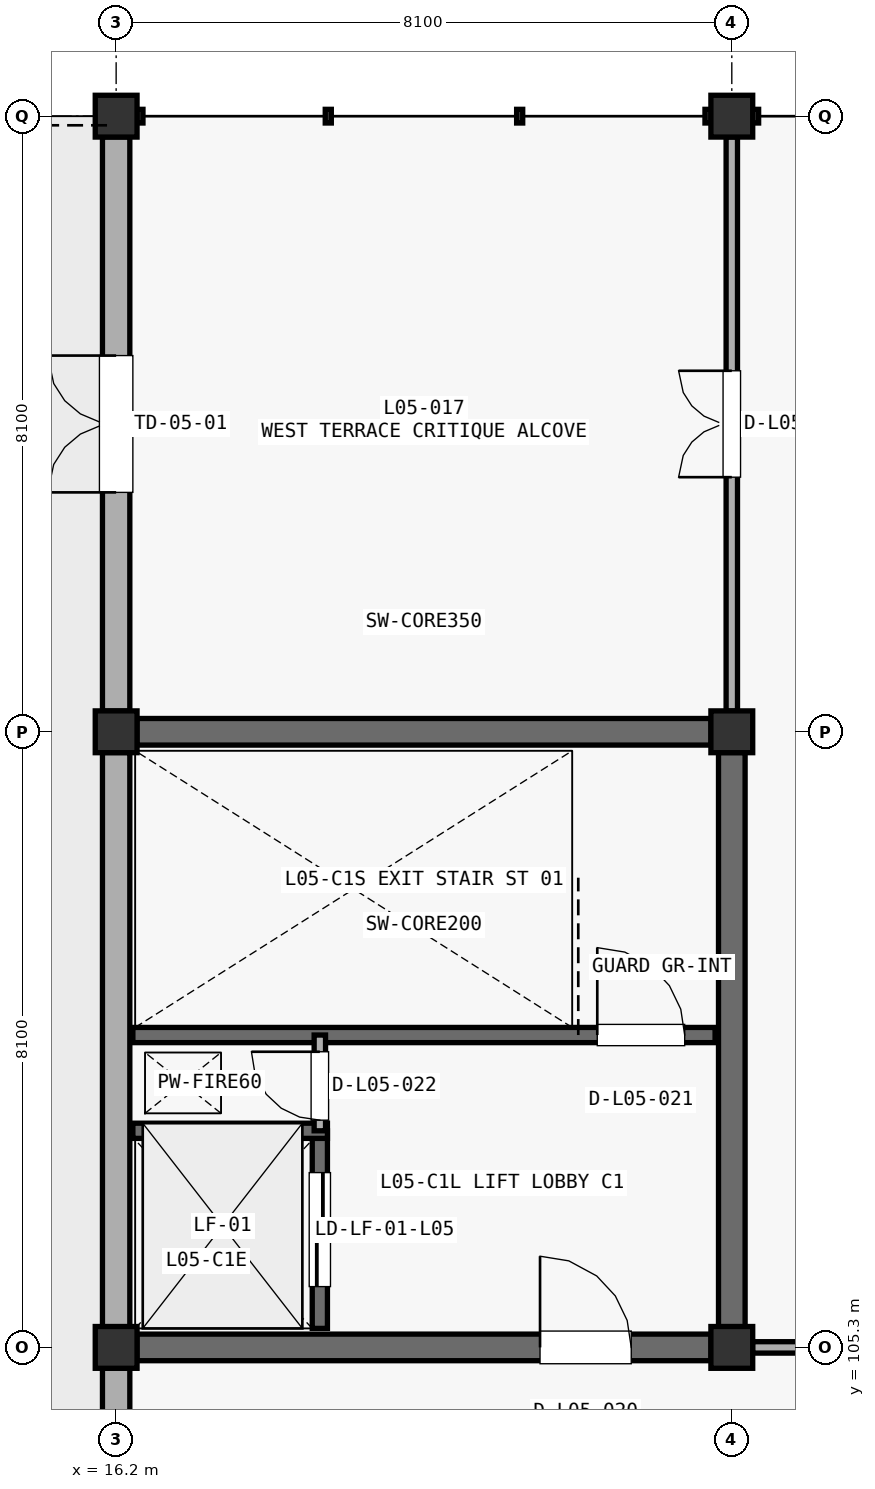
"""IFC4 building model, lengths in metres.
Left out: names, types, materials, properties, quantities, classifications, styles, units other than length and angle.
Written with IfcOpenShell. Run it as: python <this file> out.ifc"""

import sys

from ifc_helpers import new_model, si_unit, direction, frame, frame_2d, origin, origin_2d, place, context, subcontext, project, spatial, rectangle, extrude, element, fill, save


model = new_model("IFC4")
c1 = context("Model", 3, precision=1e-05, world=origin(), true_north=direction((0.0, 1.0)))
c2 = subcontext(c1, "Body", "Model", "MODEL_VIEW")
j1 = project(units=[si_unit("LENGTHUNIT", "METRE"), si_unit("PLANEANGLEUNIT", "RADIAN")], contexts=[c1])
p1 = place(None, origin())
s1 = spatial("IfcSite", under=j1, at=p1, CompositionType="ELEMENT")
p2 = place(p1, origin())
s2 = spatial("IfcBuilding", under=s1, at=p2, CompositionType="ELEMENT")
p3 = place(p2, frame((0.0, 0.0, 22.95)))
s3 = spatial("IfcBuildingStorey", under=s2, at=p3, CompositionType="ELEMENT", Elevation=22.95)
for number, where, z_axis, x_axis in (
    (1, (16.2, 105.3, 0.0), (0.0, 0.0, 1.0), (1.0, 0.0, 0.0)),
    (2, (16.2, 113.4, 0.0), (0.0, 0.0, 1.0), (1.0, 0.0, 0.0)),
    (3, (16.2, 121.5, 0.0), (0.0, 0.0, 1.0), (1.0, 0.0, 0.0)),
    (4, (24.3, 105.3, 0.0), (0.0, 0.0, 1.0), (1.0, 0.0, 0.0)),
    (5, (24.3, 113.4, 0.0), (0.0, 0.0, 1.0), (1.0, 0.0, 0.0)),
    (6, (24.3, 121.5, 0.0), (0.0, 0.0, 1.0), (1.0, 0.0, 0.0)),
):
    element("IfcColumn", number, at=place(p3, frame(where, z_axis=z_axis, x_axis=x_axis)), inside=s3, PredefinedType="COLUMN", context=c2, shape_type="SweptSolid", body=[
        extrude(rectangle(XDim=0.55, YDim=0.55, at=origin_2d()), origin(), (0.0, 0.0, 1.0), 4.42),
    ])
p4 = place(p3, frame((16.2, 97.473, 0.0), z_axis=(0.0, 0.0, 1.0), x_axis=(0.0, 1.0, 0.0)))
e7 = element("IfcWall", 7, at=p4, inside=s3, PredefinedType="STANDARD", context=c2, shape_type="SweptSolid", body=[
    extrude(rectangle(XDim=7.554, YDim=0.36, at=frame_2d((3.777, 0.0))), origin(), (0.0, 0.0, 1.0), 3.562),
])
p5 = place(p4, frame((2.827, 0.0, 0.85)))
e8 = element("IfcOpeningElement", 8, at=p5, cuts=e7, PredefinedType="OPENING", context=c2, shape_type="SweptSolid", body=[
    extrude(rectangle(XDim=1.9, YDim=1.85, at=frame_2d((0.95, 0.925))), frame((0.0, 0.19, 0.0), z_axis=(0.0, -1.0, 0.0), x_axis=(1.0, 0.0, 0.0)), (0.0, 0.0, 1.0), 0.38),
])
p6 = place(p3, frame((16.2, 105.573, 0.0), z_axis=(0.0, 0.0, 1.0), x_axis=(0.0, 1.0, 0.0)))
e9 = element("IfcWall", 9, at=p6, inside=s3, PredefinedType="STANDARD", context=c2, shape_type="SweptSolid", body=[
    extrude(rectangle(XDim=7.554, YDim=0.36, at=frame_2d((3.777, 0.0))), origin(), (0.0, 0.0, 1.0), 3.312),
])
p7 = place(p3, frame((16.2, 113.673, 0.0), z_axis=(0.0, 0.0, 1.0), x_axis=(0.0, 1.0, 0.0)))
e10 = element("IfcWall", 10, at=p7, inside=s3, PredefinedType="STANDARD", context=c2, shape_type="SweptSolid", body=[
    extrude(rectangle(XDim=7.554, YDim=0.36, at=frame_2d((3.777, 0.0))), origin(), (0.0, 0.0, 1.0), 3.857),
])
p8 = place(p7, frame((2.877, 0.0, 0.0)))
e11 = element("IfcOpeningElement", 11, at=p8, cuts=e10, PredefinedType="OPENING", context=c2, shape_type="SweptSolid", body=[
    extrude(rectangle(XDim=1.8, YDim=2.2, at=frame_2d((0.9, 1.1))), frame((0.0, 0.19, 0.0), z_axis=(0.0, -1.0, 0.0), x_axis=(1.0, 0.0, 0.0)), (0.0, 0.0, 1.0), 0.38),
])
p9 = place(p3, frame((16.473, 113.4, 0.0), z_axis=(0.0, 0.0, 1.0), x_axis=(1.0, 0.0, 0.0)))
e12 = element("IfcWall", 12, at=p9, inside=s3, PredefinedType="SHEAR", context=c2, shape_type="SweptSolid", body=[
    extrude(rectangle(XDim=7.554, YDim=0.35, at=frame_2d((3.777, 0.0))), origin(), (0.0, 0.0, 1.0), 4.162),
])
p10 = place(p3, frame((24.3, 105.573, 0.0), z_axis=(0.0, 0.0, 1.0), x_axis=(0.0, 1.0, 0.0)))
e13 = element("IfcWall", 13, at=p10, inside=s3, PredefinedType="SHEAR", context=c2, shape_type="SweptSolid", body=[
    extrude(rectangle(XDim=7.554, YDim=0.35, at=frame_2d((3.777, 0.0))), origin(), (0.0, 0.0, 1.0), 4.162),
])
p11 = place(p3, frame((16.473, 105.3, 0.0), z_axis=(0.0, 0.0, 1.0), x_axis=(1.0, 0.0, 0.0)))
e14 = element("IfcWall", 14, at=p11, inside=s3, PredefinedType="SHEAR", context=c2, shape_type="SweptSolid", body=[
    extrude(rectangle(XDim=7.554, YDim=0.35, at=frame_2d((3.777, 0.0))), origin(), (0.0, 0.0, 1.0), 4.162),
])
p12 = place(p11, frame((5.304, 0.0, 0.0)))
e15 = element("IfcOpeningElement", 15, at=p12, cuts=e14, PredefinedType="OPENING", context=c2, shape_type="SweptSolid", body=[
    extrude(rectangle(XDim=1.2, YDim=2.2, at=frame_2d((0.6, 1.1))), frame((0.0, 0.185, 0.0), z_axis=(0.0, -1.0, 0.0), x_axis=(1.0, 0.0, 0.0)), (0.0, 0.0, 1.0), 0.37),
])
p13 = place(p3, frame((16.42, 109.41, 0.0), z_axis=(0.0, 0.0, 1.0), x_axis=(1.0, 0.0, 0.0)))
e16 = element("IfcWall", 16, at=p13, inside=s3, PredefinedType="SHEAR", context=c2, shape_type="SweptSolid", body=[
    extrude(rectangle(XDim=7.66, YDim=0.2, at=frame_2d((3.83, 0.0))), origin(), (0.0, 0.0, 1.0), 4.162),
])
p14 = place(p13, frame((6.11, 0.0, 0.0)))
e17 = element("IfcOpeningElement", 17, at=p14, cuts=e16, PredefinedType="OPENING", context=c2, shape_type="SweptSolid", body=[
    extrude(rectangle(XDim=1.15, YDim=2.2, at=frame_2d((0.575, 1.1))), frame((0.0, 0.11, 0.0), z_axis=(0.0, -1.0, 0.0), x_axis=(1.0, 0.0, 0.0)), (0.0, 0.0, 1.0), 0.22),
])
p15 = place(p3, frame((18.88, 105.55, 0.0), z_axis=(0.0, 0.0, 1.0), x_axis=(0.0, 1.0, 0.0)))
e18 = element("IfcWall", 18, at=p15, inside=s3, PredefinedType="SHEAR", context=c2, shape_type="SweptSolid", body=[
    extrude(rectangle(XDim=2.6, YDim=0.2, at=frame_2d((1.3, 0.0))), origin(), (0.0, 0.0, 1.0), 4.162),
])
p16 = place(p15, frame((0.55, 0.0, 0.0)))
e19 = element("IfcOpeningElement", 19, at=p16, cuts=e18, PredefinedType="OPENING", context=c2, shape_type="SweptSolid", body=[
    extrude(rectangle(XDim=1.5, YDim=2.3, at=frame_2d((0.75, 1.15))), frame((0.0, 0.11, 0.0), z_axis=(0.0, -1.0, 0.0), x_axis=(1.0, 0.0, 0.0)), (0.0, 0.0, 1.0), 0.22),
])
p17 = place(p3, frame((16.42, 108.15, 0.0), z_axis=(0.0, 0.0, 1.0), x_axis=(1.0, 0.0, 0.0)))
e20 = element("IfcWall", 20, at=p17, inside=s3, PredefinedType="SHEAR", context=c2, shape_type="SweptSolid", body=[
    extrude(rectangle(XDim=2.56, YDim=0.2, at=frame_2d((1.28, 0.0))), origin(), (0.0, 0.0, 1.0), 4.162),
])
p18 = place(p3, frame((18.88, 108.15, 0.0), z_axis=(0.0, 0.0, 1.0), x_axis=(0.0, 1.0, 0.0)))
e21 = element("IfcWall", 21, at=p18, inside=s3, PredefinedType="PARTITIONING", context=c2, shape_type="SweptSolid", body=[
    extrude(rectangle(XDim=1.26, YDim=0.15, at=frame_2d((0.63, 0.0))), origin(), (0.0, 0.0, 1.0), 4.162),
])
p19 = place(p18, frame((0.14, 0.0, 0.0)))
e22 = element("IfcOpeningElement", 22, at=p19, cuts=e21, PredefinedType="OPENING", context=c2, shape_type="SweptSolid", body=[
    extrude(rectangle(XDim=0.9, YDim=2.15, at=frame_2d((0.45, 1.075))), frame((0.0, 0.085, 0.0), z_axis=(0.0, -1.0, 0.0), x_axis=(1.0, 0.0, 0.0)), (0.0, 0.0, 1.0), 0.17),
])
p20 = place(p3, frame((24.573, 105.3, 0.0), z_axis=(0.0, 0.0, 1.0), x_axis=(1.0, 0.0, 0.0)))
e23 = element("IfcWall", 23, at=p20, inside=s3, PredefinedType="PARTITIONING", context=c2, shape_type="SweptSolid", body=[
    extrude(rectangle(XDim=7.554, YDim=0.15, at=frame_2d((3.777, 0.0))), origin(), (0.0, 0.0, 1.0), 3.562),
])
p21 = place(p20, frame((2.957, 0.0, 0.0)))
e24 = element("IfcOpeningElement", 24, at=p21, cuts=e23, PredefinedType="OPENING", context=c2, shape_type="SweptSolid", body=[
    extrude(rectangle(XDim=1.64, YDim=2.25, at=frame_2d((0.82, 1.125))), frame((0.0, 0.085, 0.0), z_axis=(0.0, -1.0, 0.0), x_axis=(1.0, 0.0, 0.0)), (0.0, 0.0, 1.0), 0.17),
])
p22 = place(p3, frame((24.3, 113.673, 0.0), z_axis=(0.0, 0.0, 1.0), x_axis=(0.0, 1.0, 0.0)))
e25 = element("IfcWall", 25, at=p22, inside=s3, PredefinedType="PARTITIONING", context=c2, shape_type="SweptSolid", body=[
    extrude(rectangle(XDim=7.554, YDim=0.15, at=frame_2d((3.777, 0.0))), origin(), (0.0, 0.0, 1.0), 3.512),
])
p23 = place(p22, frame((3.077, 0.0, 0.0)))
e26 = element("IfcOpeningElement", 26, at=p23, cuts=e25, PredefinedType="OPENING", context=c2, shape_type="SweptSolid", body=[
    extrude(rectangle(XDim=1.4, YDim=2.2, at=frame_2d((0.7, 1.1))), frame((0.0, 0.085, 0.0), z_axis=(0.0, -1.0, 0.0), x_axis=(1.0, 0.0, 0.0)), (0.0, 0.0, 1.0), 0.17),
])
p24 = place(p8, origin())
e27 = element("IfcDoor", 27, at=p24, inside=s3, OperationType="DOUBLE_SWING_RIGHT", PredefinedType="DOOR", context=c2, shape_type="SweptSolid", body=[
    extrude(rectangle(XDim=1.8, YDim=2.2, at=frame_2d((0.9, 1.1))), frame((0.0, 0.025, 0.0), z_axis=(0.0, -1.0, 0.0), x_axis=(1.0, 0.0, 0.0)), (0.0, 0.0, 1.0), 0.05),
])
fill(e11, e27)
p25 = place(p12, origin())
e28 = element("IfcDoor", 28, at=p25, inside=s3, OperationType="SINGLE_SWING_LEFT", PredefinedType="DOOR", context=c2, shape_type="SweptSolid", body=[
    extrude(rectangle(XDim=1.2, YDim=2.2, at=frame_2d((0.6, 1.1))), frame((0.0, 0.025, 0.0), z_axis=(0.0, -1.0, 0.0), x_axis=(1.0, 0.0, 0.0)), (0.0, 0.0, 1.0), 0.05),
])
fill(e15, e28)
p26 = place(p14, origin())
e29 = element("IfcDoor", 29, at=p26, inside=s3, OperationType="SINGLE_SWING_LEFT", PredefinedType="DOOR", context=c2, shape_type="SweptSolid", body=[
    extrude(rectangle(XDim=1.15, YDim=2.2, at=frame_2d((0.575, 1.1))), frame((0.0, 0.025, 0.0), z_axis=(0.0, -1.0, 0.0), x_axis=(1.0, 0.0, 0.0)), (0.0, 0.0, 1.0), 0.05),
])
fill(e17, e29)
p27 = place(p16, origin())
e30 = element("IfcDoor", 30, at=p27, inside=s3, OperationType="SLIDING_TO_LEFT", PredefinedType="DOOR", context=c2, shape_type="SweptSolid", body=[
    extrude(rectangle(XDim=1.5, YDim=2.3, at=frame_2d((0.75, 1.15))), frame((0.0, 0.025, 0.0), z_axis=(0.0, -1.0, 0.0), x_axis=(1.0, 0.0, 0.0)), (0.0, 0.0, 1.0), 0.05),
])
fill(e19, e30)
p28 = place(p19, origin())
e31 = element("IfcDoor", 31, at=p28, inside=s3, OperationType="SINGLE_SWING_RIGHT", PredefinedType="DOOR", context=c2, shape_type="SweptSolid", body=[
    extrude(rectangle(XDim=0.9, YDim=2.15, at=frame_2d((0.45, 1.075))), frame((0.0, 0.025, 0.0), z_axis=(0.0, -1.0, 0.0), x_axis=(1.0, 0.0, 0.0)), (0.0, 0.0, 1.0), 0.05),
])
fill(e22, e31)
p29 = place(p23, origin())
e32 = element("IfcDoor", 32, at=p29, inside=s3, OperationType="DOUBLE_SWING_LEFT", PredefinedType="DOOR", context=c2, shape_type="SweptSolid", body=[
    extrude(rectangle(XDim=1.4, YDim=2.2, at=frame_2d((0.7, 1.1))), frame((0.0, 0.025, 0.0), z_axis=(0.0, -1.0, 0.0), x_axis=(1.0, 0.0, 0.0)), (0.0, 0.0, 1.0), 0.05),
])
fill(e26, e32)
save(model, sys.argv[1])
